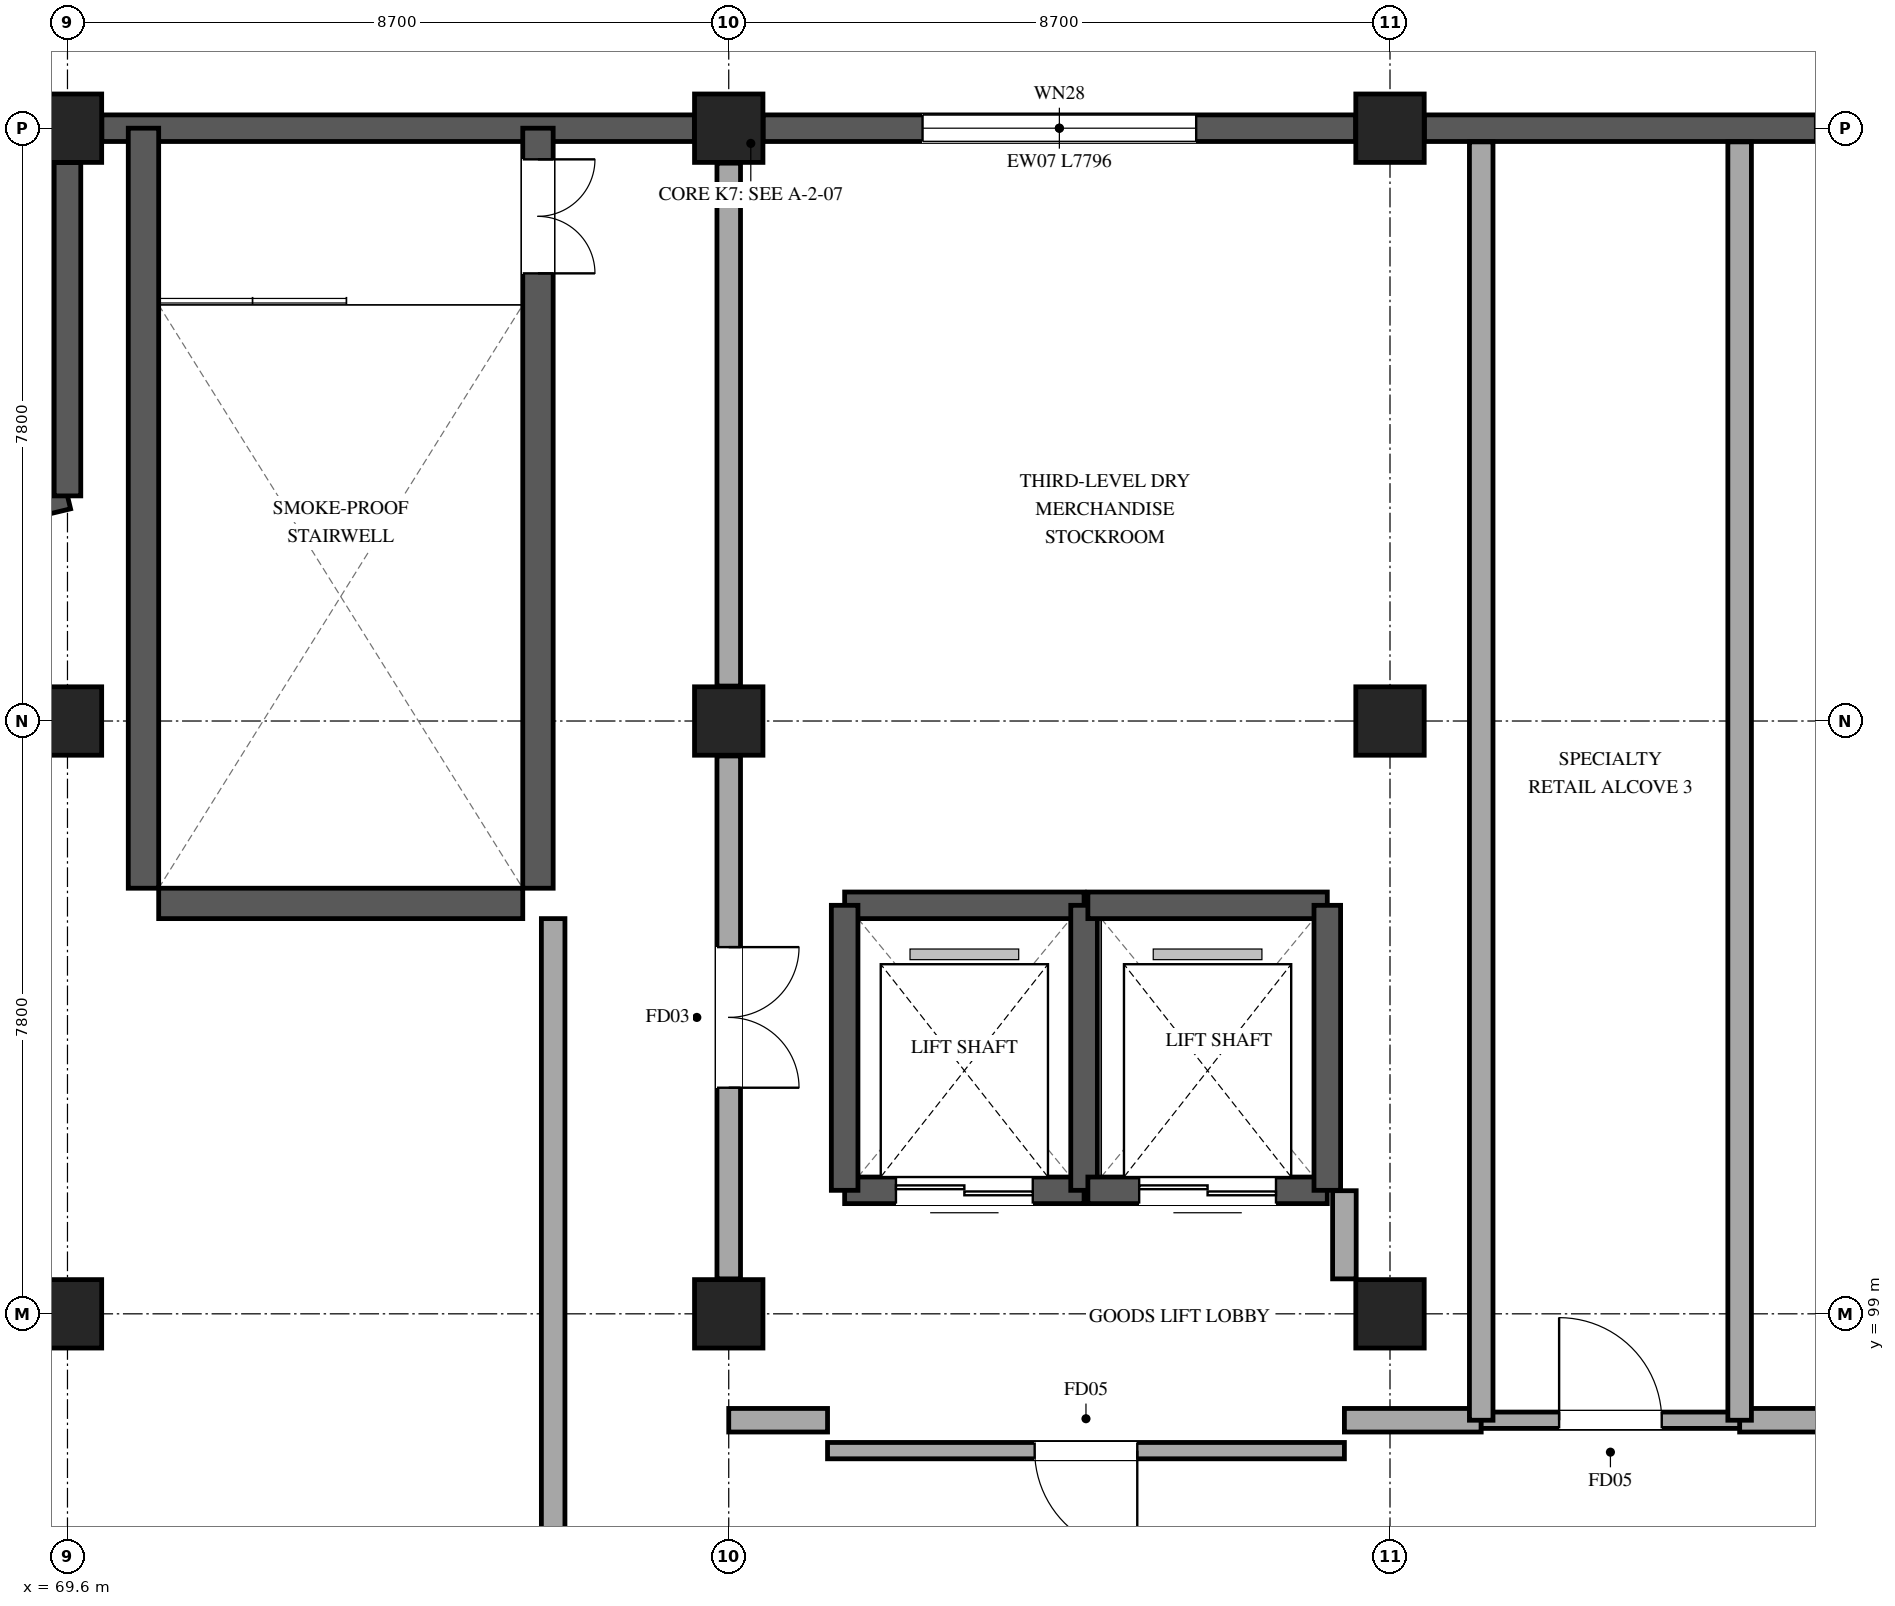
"""IFC4 building model, lengths in metres.
Left out: names, types, materials, properties, quantities, classifications, styles, units other than length and angle.
Written with IfcOpenShell. Run it as: python <this file> out.ifc"""

import sys

from ifc_helpers import new_model, si_unit, direction, frame, frame_2d, origin, origin_2d, place, context, subcontext, project, spatial, rectangle, extrude, element, fill, save


model = new_model("IFC4")
c1 = context("Model", 3, precision=1e-05, world=origin(), true_north=direction((0.0, 1.0)))
c2 = subcontext(c1, "Body", "Model", "MODEL_VIEW")
j1 = project(units=[si_unit("LENGTHUNIT", "METRE"), si_unit("PLANEANGLEUNIT", "RADIAN")], contexts=[c1])
p1 = place(None, origin())
s1 = spatial("IfcSite", under=j1, at=p1, CompositionType="ELEMENT")
p2 = place(p1, origin())
s2 = spatial("IfcBuilding", under=s1, at=p2, CompositionType="ELEMENT")
p3 = place(p2, frame((0.0, 0.0, 11.4)))
s3 = spatial("IfcBuildingStorey", under=s2, at=p3, CompositionType="ELEMENT", Elevation=11.4)
for number, where, z_axis, x_axis in (
    (1, (69.6, 99.0, 0.0), (0.0, 0.0, 1.0), (1.0, 0.0, 0.0)),
    (2, (69.6, 106.8, 0.0), (0.0, 0.0, 1.0), (1.0, 0.0, 0.0)),
    (3, (69.6, 114.6, 0.0), (0.0, 0.0, 1.0), (1.0, 0.0, 0.0)),
    (4, (78.3, 99.0, 0.0), (0.0, 0.0, 1.0), (1.0, 0.0, 0.0)),
    (5, (78.3, 106.8, 0.0), (0.0, 0.0, 1.0), (1.0, 0.0, 0.0)),
    (6, (78.3, 114.6, 0.0), (0.0, 0.0, 1.0), (1.0, 0.0, 0.0)),
    (7, (87.0, 99.0, 0.0), (0.0, 0.0, 1.0), (1.0, 0.0, 0.0)),
    (8, (87.0, 106.8, 0.0), (0.0, 0.0, 1.0), (1.0, 0.0, 0.0)),
    (9, (87.0, 114.6, 0.0), (0.0, 0.0, 1.0), (1.0, 0.0, 0.0)),
):
    element("IfcColumn", number, at=place(p3, frame(where, z_axis=z_axis, x_axis=x_axis)), inside=s3, PredefinedType="COLUMN", context=c2, shape_type="SweptSolid", body=[
        extrude(rectangle(XDim=0.9, YDim=0.9, at=origin_2d()), origin(), (0.0, 0.0, 1.0), 5.1),
    ])
p4 = place(p3, frame((68.365, 109.466, 0.0), z_axis=(0.0, 0.0, 1.0), x_axis=(0.972481446434, 0.232980334667, 0.0)))
e10 = element("IfcWall", 10, at=p4, inside=s3, PredefinedType="STANDARD", context=c2, shape_type="SweptSolid", body=[
    extrude(rectangle(XDim=1.27, YDim=0.35, at=frame_2d((0.635, 0.0))), origin(), (0.0, 0.0, 1.0), 4.79),
])
p5 = place(p3, frame((69.6, 109.762, 0.0), z_axis=(0.0, 0.0, 1.0), x_axis=(0.0, 1.0, 0.0)))
e11 = element("IfcWall", 11, at=p5, inside=s3, PredefinedType="STANDARD", context=c2, shape_type="SweptSolid", body=[
    extrude(rectangle(XDim=4.386, YDim=0.35, at=frame_2d((2.193, 0.0))), origin(), (0.0, 0.0, 1.0), 4.79),
])
p6 = place(p3, frame((70.052, 114.6, 0.0), z_axis=(0.0, 0.0, 1.0), x_axis=(1.0, 0.0, 0.0)))
e12 = element("IfcWall", 12, at=p6, inside=s3, PredefinedType="STANDARD", context=c2, shape_type="SweptSolid", body=[
    extrude(rectangle(XDim=7.796, YDim=0.35, at=frame_2d((3.898, 0.0))), origin(), (0.0, 0.0, 1.0), 4.79),
])
p7 = place(p3, frame((78.752, 114.6, 0.0), z_axis=(0.0, 0.0, 1.0), x_axis=(1.0, 0.0, 0.0)))
e13 = element("IfcWall", 13, at=p7, inside=s3, PredefinedType="STANDARD", context=c2, shape_type="SweptSolid", body=[
    extrude(rectangle(XDim=7.796, YDim=0.35, at=frame_2d((3.898, 0.0))), origin(), (0.0, 0.0, 1.0), 4.79),
])
p8 = place(p7, frame((2.098, 0.0, 0.85)))
e14 = element("IfcOpeningElement", 14, at=p8, cuts=e13, PredefinedType="OPENING", context=c2, shape_type="SweptSolid", body=[
    extrude(rectangle(XDim=3.6, YDim=1.85, at=frame_2d((1.8, 0.925))), frame((0.0, 0.185, 0.0), z_axis=(0.0, -1.0, 0.0), x_axis=(1.0, 0.0, 0.0)), (0.0, 0.0, 1.0), 0.37),
])
p9 = place(p3, frame((87.452, 114.6, 0.0), z_axis=(0.0, 0.0, 1.0), x_axis=(1.0, 0.0, 0.0)))
e15 = element("IfcWall", 15, at=p9, inside=s3, PredefinedType="STANDARD", context=c2, shape_type="SweptSolid", body=[
    extrude(rectangle(XDim=7.796, YDim=0.35, at=frame_2d((3.898, 0.0))), origin(), (0.0, 0.0, 1.0), 4.79),
])
p10 = place(p9, frame((5.141, 0.0, 0.85)))
e16 = element("IfcOpeningElement", 16, at=p10, cuts=e15, PredefinedType="OPENING", context=c2, shape_type="SweptSolid", body=[
    extrude(rectangle(XDim=2.0, YDim=1.65, at=frame_2d((1.0, 0.825))), frame((0.0, 0.185, 0.0), z_axis=(0.0, -1.0, 0.0), x_axis=(1.0, 0.0, 0.0)), (0.0, 0.0, 1.0), 0.37),
])
p11 = place(p3, frame((70.6, 104.6, 0.0), z_axis=(0.0, 0.0, 1.0), x_axis=(0.0, 1.0, 0.0)))
e17 = element("IfcWall", 17, at=p11, inside=s3, PredefinedType="SHEAR", context=c2, shape_type="SweptSolid", body=[
    extrude(rectangle(XDim=10.0, YDim=0.4, at=frame_2d((5.0, 0.0))), origin(), (0.0, 0.0, 1.0), 5.1),
])
p12 = place(p3, frame((75.79, 114.6, 0.0), z_axis=(0.0, 0.0, 1.0), x_axis=(0.0, -1.0, 0.0)))
e18 = element("IfcWall", 18, at=p12, inside=s3, PredefinedType="SHEAR", context=c2, shape_type="SweptSolid", body=[
    extrude(rectangle(XDim=10.0, YDim=0.4, at=frame_2d((5.0, 0.0))), origin(), (0.0, 0.0, 1.0), 5.1),
])
p13 = place(p12, frame((0.41, 0.0, 0.0)))
e19 = element("IfcOpeningElement", 19, at=p13, cuts=e18, PredefinedType="OPENING", context=c2, shape_type="SweptSolid", body=[
    extrude(rectangle(XDim=1.5, YDim=2.2, at=frame_2d((0.75, 1.1))), frame((0.0, 0.21, 0.0), z_axis=(0.0, -1.0, 0.0), x_axis=(1.0, 0.0, 0.0)), (0.0, 0.0, 1.0), 0.42),
])
p14 = place(p3, frame((75.59, 104.4, 0.0), z_axis=(0.0, 0.0, 1.0), x_axis=(-1.0, 0.0, 0.0)))
e20 = element("IfcWall", 20, at=p14, inside=s3, PredefinedType="SHEAR", context=c2, shape_type="SweptSolid", body=[
    extrude(rectangle(XDim=4.79, YDim=0.4, at=frame_2d((2.395, 0.0))), origin(), (0.0, 0.0, 1.0), 5.1),
])
p15 = place(p3, frame((79.825, 104.375, 0.0), z_axis=(0.0, 0.0, 1.0), x_axis=(1.0, 0.0, 0.0)))
e21 = element("IfcWall", 21, at=p15, inside=s3, PredefinedType="SHEAR", context=c2, shape_type="SweptSolid", body=[
    extrude(rectangle(XDim=3.15, YDim=0.35, at=frame_2d((1.575, 0.0))), origin(), (0.0, 0.0, 1.0), 5.1),
])
p16 = place(p3, frame((82.975, 100.625, 0.0), z_axis=(0.0, 0.0, 1.0), x_axis=(-1.0, 0.0, 0.0)))
e22 = element("IfcWall", 22, at=p16, inside=s3, PredefinedType="SHEAR", context=c2, shape_type="SweptSolid", body=[
    extrude(rectangle(XDim=3.15, YDim=0.35, at=frame_2d((1.575, 0.0))), origin(), (0.0, 0.0, 1.0), 5.1),
])
p17 = place(p16, frame((0.675, 0.0, 0.0)))
e23 = element("IfcOpeningElement", 23, at=p17, cuts=e22, PredefinedType="OPENING", context=c2, shape_type="SweptSolid", body=[
    extrude(rectangle(XDim=1.8, YDim=2.4, at=frame_2d((0.9, 1.2))), frame((0.0, 0.185, 0.0), z_axis=(0.0, -1.0, 0.0), x_axis=(1.0, 0.0, 0.0)), (0.0, 0.0, 1.0), 0.37),
])
for number, where, z_axis, x_axis in (
    (24, (79.825, 100.625, 0.0), (0.0, 0.0, 1.0), (0.0, 1.0, 0.0)),
    (25, (82.975, 104.375, 0.0), (0.0, 0.0, 1.0), (0.0, -1.0, 0.0)),
):
    element("IfcWall", number, at=place(p3, frame(where, z_axis=z_axis, x_axis=x_axis)), inside=s3, PredefinedType="SHEAR", context=c2, shape_type="SweptSolid", body=[
        extrude(rectangle(XDim=3.75, YDim=0.35, at=frame_2d((1.875, 0.0))), origin(), (0.0, 0.0, 1.0), 5.1),
    ])
p18 = place(p3, frame((83.025, 104.375, 0.0), z_axis=(0.0, 0.0, 1.0), x_axis=(1.0, 0.0, 0.0)))
e26 = element("IfcWall", 26, at=p18, inside=s3, PredefinedType="SHEAR", context=c2, shape_type="SweptSolid", body=[
    extrude(rectangle(XDim=3.15, YDim=0.35, at=frame_2d((1.575, 0.0))), origin(), (0.0, 0.0, 1.0), 5.1),
])
p19 = place(p3, frame((86.175, 100.625, 0.0), z_axis=(0.0, 0.0, 1.0), x_axis=(-1.0, 0.0, 0.0)))
e27 = element("IfcWall", 27, at=p19, inside=s3, PredefinedType="SHEAR", context=c2, shape_type="SweptSolid", body=[
    extrude(rectangle(XDim=3.15, YDim=0.35, at=frame_2d((1.575, 0.0))), origin(), (0.0, 0.0, 1.0), 5.1),
])
p20 = place(p19, frame((0.675, 0.0, 0.0)))
e28 = element("IfcOpeningElement", 28, at=p20, cuts=e27, PredefinedType="OPENING", context=c2, shape_type="SweptSolid", body=[
    extrude(rectangle(XDim=1.8, YDim=2.4, at=frame_2d((0.9, 1.2))), frame((0.0, 0.185, 0.0), z_axis=(0.0, -1.0, 0.0), x_axis=(1.0, 0.0, 0.0)), (0.0, 0.0, 1.0), 0.37),
])
p21 = place(p3, frame((86.175, 104.375, 0.0), z_axis=(0.0, 0.0, 1.0), x_axis=(0.0, -1.0, 0.0)))
e29 = element("IfcWall", 29, at=p21, inside=s3, PredefinedType="SHEAR", context=c2, shape_type="SweptSolid", body=[
    extrude(rectangle(XDim=3.75, YDim=0.35, at=frame_2d((1.875, 0.0))), origin(), (0.0, 0.0, 1.0), 5.1),
])
p22 = place(p3, frame((86.4, 97.2, 0.0), z_axis=(0.0, 0.0, 1.0), x_axis=(-1.0, 0.0, 0.0)))
e30 = element("IfcWall", 30, at=p22, inside=s3, PredefinedType="PARTITIONING", context=c2, shape_type="SweptSolid", body=[
    extrude(rectangle(XDim=6.8, YDim=0.215, at=frame_2d((3.4, 0.0))), origin(), (0.0, 0.0, 1.0), 4.76),
])
p23 = place(p22, frame((2.725, 0.0, 0.0)))
e31 = element("IfcOpeningElement", 31, at=p23, cuts=e30, PredefinedType="OPENING", context=c2, shape_type="SweptSolid", body=[
    extrude(rectangle(XDim=1.35, YDim=2.2, at=frame_2d((0.675, 1.1))), frame((0.0, 0.118, 0.0), z_axis=(0.0, -1.0, 0.0), x_axis=(1.0, 0.0, 0.0)), (0.0, 0.0, 1.0), 0.235),
])
p24 = place(p3, frame((86.4, 100.62, 0.0), z_axis=(0.0, 0.0, 1.0), x_axis=(0.0, -1.0, 0.0)))
e32 = element("IfcWall", 32, at=p24, inside=s3, PredefinedType="STANDARD", context=c2, shape_type="SweptSolid", body=[
    extrude(rectangle(XDim=1.16, YDim=0.31, at=frame_2d((0.58, 0.0))), origin(), (0.0, 0.0, 1.0), 4.76),
])
p25 = place(p3, frame((75.99, 94.8, 0.0), z_axis=(0.0, 0.0, 1.0), x_axis=(0.0, 1.0, 0.0)))
e33 = element("IfcWall", 33, at=p25, inside=s3, PredefinedType="STANDARD", context=c2, shape_type="SweptSolid", body=[
    extrude(rectangle(XDim=9.4, YDim=0.31, at=frame_2d((4.7, 0.0))), origin(), (0.0, 0.0, 1.0), 4.06),
])
p26 = place(p3, frame((78.3, 114.14, 0.0), z_axis=(0.0, 0.0, 1.0), x_axis=(0.0, -1.0, 0.0)))
e34 = element("IfcWall", 34, at=p26, inside=s3, PredefinedType="STANDARD", context=c2, shape_type="SweptSolid", body=[
    extrude(rectangle(XDim=6.88, YDim=0.31, at=frame_2d((3.44, 0.0))), origin(), (0.0, 0.0, 1.0), 4.06),
])
p27 = place(p3, frame((78.3, 106.34, 0.0), z_axis=(0.0, 0.0, 1.0), x_axis=(0.0, -1.0, 0.0)))
e35 = element("IfcWall", 35, at=p27, inside=s3, PredefinedType="STANDARD", context=c2, shape_type="SweptSolid", body=[
    extrude(rectangle(XDim=6.88, YDim=0.31, at=frame_2d((3.44, 0.0))), origin(), (0.0, 0.0, 1.0), 4.06),
])
p28 = place(p27, frame((2.515, 0.0, 0.0)))
e36 = element("IfcOpeningElement", 36, at=p28, cuts=e35, PredefinedType="OPENING", context=c2, shape_type="SweptSolid", body=[
    extrude(rectangle(XDim=1.85, YDim=2.3, at=frame_2d((0.925, 1.15))), frame((0.0, 0.165, 0.0), z_axis=(0.0, -1.0, 0.0), x_axis=(1.0, 0.0, 0.0)), (0.0, 0.0, 1.0), 0.33),
])
p29 = place(p3, frame((78.3, 97.6, 0.0), z_axis=(0.0, 0.0, 1.0), x_axis=(1.0, 0.0, 0.0)))
e37 = element("IfcWall", 37, at=p29, inside=s3, PredefinedType="STANDARD", context=c2, shape_type="SweptSolid", body=[
    extrude(rectangle(XDim=1.3, YDim=0.31, at=frame_2d((0.65, 0.0))), origin(), (0.0, 0.0, 1.0), 4.06),
])
p30 = place(p3, frame((86.4, 97.6, 0.0), z_axis=(0.0, 0.0, 1.0), x_axis=(1.0, 0.0, 0.0)))
e38 = element("IfcWall", 38, at=p30, inside=s3, PredefinedType="STANDARD", context=c2, shape_type="SweptSolid", body=[
    extrude(rectangle(XDim=1.8, YDim=0.31, at=frame_2d((0.9, 0.0))), origin(), (0.0, 0.0, 1.0), 4.06),
])
p31 = place(p3, frame((91.6, 97.6, 0.0), z_axis=(0.0, 0.0, 1.0), x_axis=(1.0, 0.0, 0.0)))
e39 = element("IfcWall", 39, at=p31, inside=s3, PredefinedType="STANDARD", context=c2, shape_type="SweptSolid", body=[
    extrude(rectangle(XDim=12.8, YDim=0.31, at=frame_2d((6.4, 0.0))), origin(), (0.0, 0.0, 1.0), 4.06),
])
p32 = place(p31, frame((5.475, 0.0, 0.0)))
e40 = element("IfcOpeningElement", 40, at=p32, cuts=e39, PredefinedType="OPENING", context=c2, shape_type="SweptSolid", body=[
    extrude(rectangle(XDim=1.85, YDim=2.3, at=frame_2d((0.925, 1.15))), frame((0.0, 0.165, 0.0), z_axis=(0.0, -1.0, 0.0), x_axis=(1.0, 0.0, 0.0)), (0.0, 0.0, 1.0), 0.33),
])
p33 = place(p3, frame((88.2, 97.6, 0.0), z_axis=(0.0, 0.0, 1.0), x_axis=(1.0, 0.0, 0.0)))
e41 = element("IfcWall", 41, at=p33, inside=s3, PredefinedType="PARTITIONING", context=c2, shape_type="SweptSolid", body=[
    extrude(rectangle(XDim=3.4, YDim=0.215, at=frame_2d((1.7, 0.0))), origin(), (0.0, 0.0, 1.0), 4.76),
])
p34 = place(p33, frame((1.025, 0.0, 0.0)))
e42 = element("IfcOpeningElement", 42, at=p34, cuts=e41, PredefinedType="OPENING", context=c2, shape_type="SweptSolid", body=[
    extrude(rectangle(XDim=1.35, YDim=2.2, at=frame_2d((0.675, 1.1))), frame((0.0, 0.118, 0.0), z_axis=(0.0, -1.0, 0.0), x_axis=(1.0, 0.0, 0.0)), (0.0, 0.0, 1.0), 0.235),
])
for number, where, z_axis, x_axis in (
    (43, (88.2, 114.42, 0.0), (0.0, 0.0, 1.0), (0.0, -1.0, 0.0)),
    (44, (91.6, 97.6, 0.0), (0.0, 0.0, 1.0), (0.0, 1.0, 0.0)),
):
    element("IfcWall", number, at=place(p3, frame(where, z_axis=z_axis, x_axis=x_axis)), inside=s3, PredefinedType="STANDARD", context=c2, shape_type="SweptSolid", body=[
        extrude(rectangle(XDim=16.82, YDim=0.31, at=frame_2d((8.41, 0.0))), origin(), (0.0, 0.0, 1.0), 4.06),
    ])
p35 = place(p8, origin())
e45 = element("IfcWindow", 45, at=p35, inside=s3, PartitioningType="TRIPLE_PANEL_VERTICAL", PredefinedType="WINDOW", context=c2, shape_type="SweptSolid", body=[
    extrude(rectangle(XDim=3.6, YDim=1.85, at=frame_2d((1.8, 0.925))), frame((0.0, 0.03, 0.0), z_axis=(0.0, -1.0, 0.0), x_axis=(1.0, 0.0, 0.0)), (0.0, 0.0, 1.0), 0.06),
])
fill(e14, e45)
p36 = place(p10, origin())
e46 = element("IfcWindow", 46, at=p36, inside=s3, PartitioningType="TRIPLE_PANEL_VERTICAL", PredefinedType="WINDOW", context=c2, shape_type="SweptSolid", body=[
    extrude(rectangle(XDim=2.0, YDim=1.65, at=frame_2d((1.0, 0.825))), frame((0.0, 0.03, 0.0), z_axis=(0.0, -1.0, 0.0), x_axis=(1.0, 0.0, 0.0)), (0.0, 0.0, 1.0), 0.06),
])
fill(e16, e46)
p37 = place(p13, origin())
e47 = element("IfcDoor", 47, at=p37, inside=s3, OperationType="DOUBLE_DOOR_SINGLE_SWING", PredefinedType="DOOR", context=c2, shape_type="SweptSolid", body=[
    extrude(rectangle(XDim=1.5, YDim=2.2, at=frame_2d((0.75, 1.1))), frame((0.0, 0.025, 0.0), z_axis=(0.0, -1.0, 0.0), x_axis=(1.0, 0.0, 0.0)), (0.0, 0.0, 1.0), 0.05),
])
fill(e19, e47)
p38 = place(p17, origin())
e48 = element("IfcDoor", 48, at=p38, inside=s3, OperationType="DOUBLE_DOOR_SLIDING", PredefinedType="DOOR", context=c2, shape_type="SweptSolid", body=[
    extrude(rectangle(XDim=1.8, YDim=2.4, at=frame_2d((0.9, 1.2))), frame((0.0, 0.025, 0.0), z_axis=(0.0, -1.0, 0.0), x_axis=(1.0, 0.0, 0.0)), (0.0, 0.0, 1.0), 0.05),
])
fill(e23, e48)
p39 = place(p20, origin())
e49 = element("IfcDoor", 49, at=p39, inside=s3, OperationType="DOUBLE_DOOR_SLIDING", PredefinedType="DOOR", context=c2, shape_type="SweptSolid", body=[
    extrude(rectangle(XDim=1.8, YDim=2.4, at=frame_2d((0.9, 1.2))), frame((0.0, 0.025, 0.0), z_axis=(0.0, -1.0, 0.0), x_axis=(1.0, 0.0, 0.0)), (0.0, 0.0, 1.0), 0.05),
])
fill(e28, e49)
p40 = place(p23, origin())
e50 = element("IfcDoor", 50, at=p40, inside=s3, OperationType="SINGLE_SWING_LEFT", PredefinedType="DOOR", context=c2, shape_type="SweptSolid", body=[
    extrude(rectangle(XDim=1.35, YDim=2.2, at=frame_2d((0.675, 1.1))), frame((0.0, 0.025, 0.0), z_axis=(0.0, -1.0, 0.0), x_axis=(1.0, 0.0, 0.0)), (0.0, 0.0, 1.0), 0.05),
])
fill(e31, e50)
p41 = place(p28, origin())
e51 = element("IfcDoor", 51, at=p41, inside=s3, OperationType="DOUBLE_DOOR_SINGLE_SWING", PredefinedType="DOOR", context=c2, shape_type="SweptSolid", body=[
    extrude(rectangle(XDim=1.85, YDim=2.3, at=frame_2d((0.925, 1.15))), frame((0.0, 0.025, 0.0), z_axis=(0.0, -1.0, 0.0), x_axis=(1.0, 0.0, 0.0)), (0.0, 0.0, 1.0), 0.05),
])
fill(e36, e51)
p42 = place(p34, origin())
e52 = element("IfcDoor", 52, at=p42, inside=s3, OperationType="SINGLE_SWING_LEFT", PredefinedType="DOOR", context=c2, shape_type="SweptSolid", body=[
    extrude(rectangle(XDim=1.35, YDim=2.2, at=frame_2d((0.675, 1.1))), frame((0.0, 0.025, 0.0), z_axis=(0.0, -1.0, 0.0), x_axis=(1.0, 0.0, 0.0)), (0.0, 0.0, 1.0), 0.05),
])
fill(e42, e52)
save(model, sys.argv[1])
